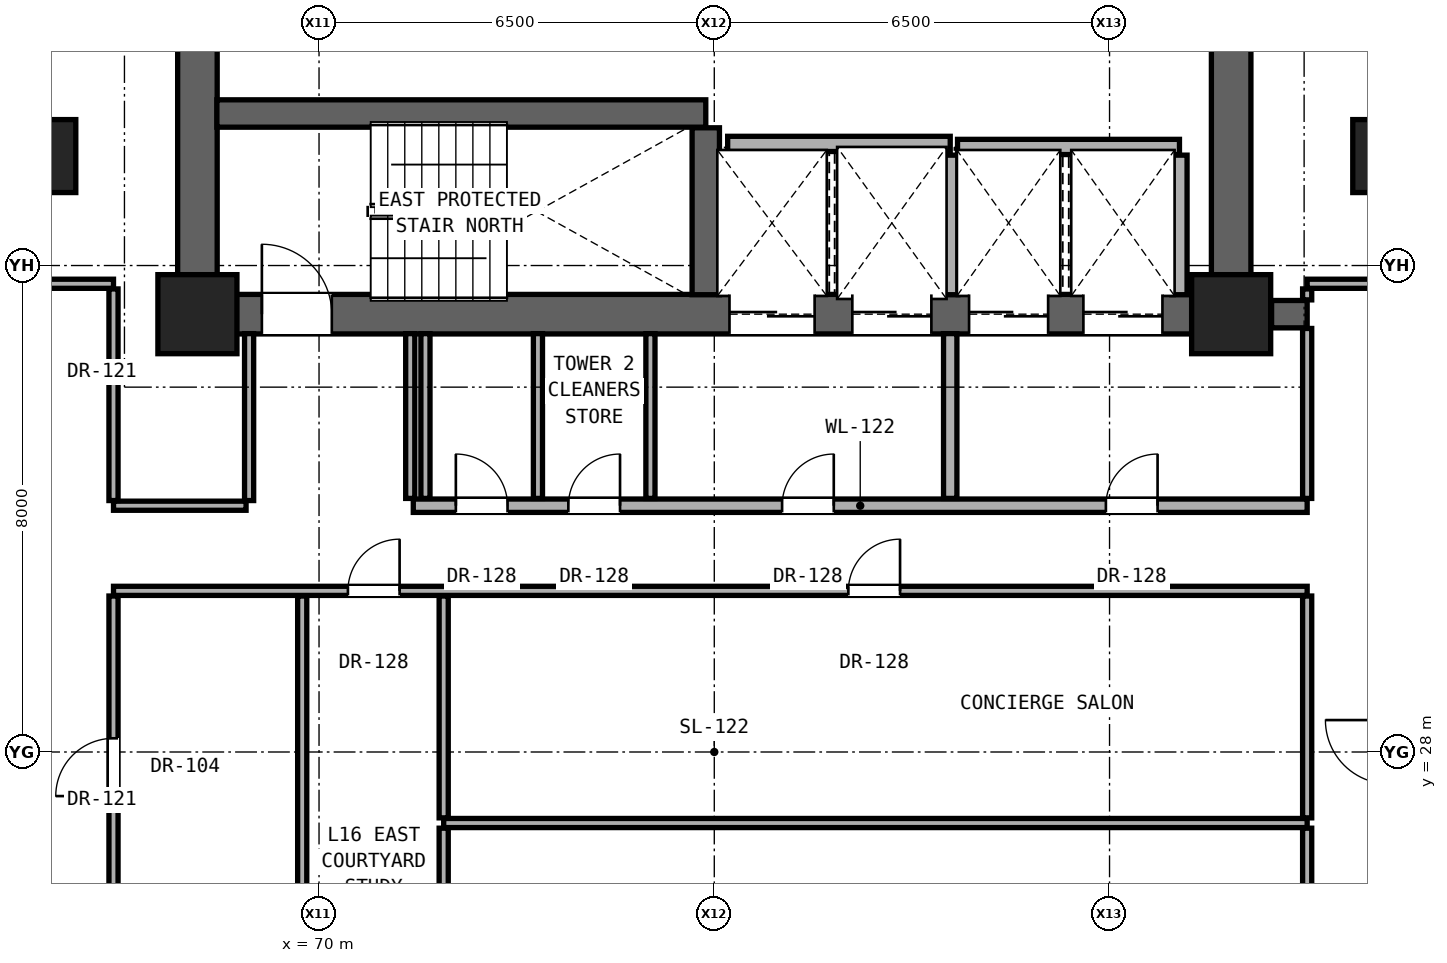
"""IFC4 building model, lengths in metres.
Left out: names, types, materials, properties, quantities, classifications, styles, units other than length and angle.
Written with IfcOpenShell. Run it as: python <this file> out.ifc"""

import sys

from ifc_helpers import new_model, si_unit, direction, frame, frame_2d, origin, origin_2d, place, context, subcontext, project, spatial, rectangle, extrude, element, fill, save


model = new_model("IFC4")
c1 = context("Model", 3, precision=1e-05, world=origin(), true_north=direction((0.0, 1.0)))
c2 = subcontext(c1, "Body", "Model", "MODEL_VIEW")
j1 = project(units=[si_unit("LENGTHUNIT", "METRE"), si_unit("PLANEANGLEUNIT", "RADIAN")], contexts=[c1])
p1 = place(None, origin())
s1 = spatial("IfcSite", under=j1, at=p1, CompositionType="ELEMENT")
p2 = place(p1, origin())
s2 = spatial("IfcBuilding", under=s1, at=p2, CompositionType="ELEMENT")
p3 = place(p2, frame((0.0, 0.0, 58.7)))
s3 = spatial("IfcBuildingStorey", under=s2, at=p3, CompositionType="ELEMENT", Elevation=58.7)
for number, where, z_axis, x_axis in (
    (1, (68.0, 35.2, 0.0), (0.0, 0.0, 1.0), (1.0, 0.0, 0.0)),
    (2, (85.0, 35.2, 0.0), (0.0, 0.0, 1.0), (1.0, 0.0, 0.0)),
):
    element("IfcColumn", number, at=place(p3, frame(where, z_axis=z_axis, x_axis=x_axis)), inside=s3, PredefinedType="COLUMN", context=c2, shape_type="SweptSolid", body=[
        extrude(rectangle(XDim=1.3, YDim=1.3, at=origin_2d()), origin(), (0.0, 0.0, 1.0), 3.3),
    ])
for number, where, z_axis, x_axis in (
    (3, (65.6, 37.8, 0.0), (0.0, 0.0, 1.0), (1.0, 0.0, 0.0)),
    (4, (87.4, 37.8, 0.0), (0.0, 0.0, 1.0), (1.0, 0.0, 0.0)),
):
    element("IfcColumn", number, at=place(p3, frame(where, z_axis=z_axis, x_axis=x_axis)), inside=s3, PredefinedType="PILASTER", context=c2, shape_type="SweptSolid", body=[
        extrude(rectangle(XDim=0.8, YDim=1.2, at=origin_2d()), origin(), (0.0, 0.0, 1.0), 3.3),
    ])
for number, where, z_axis, x_axis in (
    (5, (68.0, 35.2, 0.0), (0.0, 0.0, 1.0), (0.0, 1.0, 0.0)),
    (6, (85.0, 35.2, 0.0), (0.0, 0.0, 1.0), (0.0, 1.0, 0.0)),
):
    element("IfcWall", number, at=place(p3, frame(where, z_axis=z_axis, x_axis=x_axis)), inside=s3, PredefinedType="SHEAR", context=c2, shape_type="SweptSolid", body=[
        extrude(rectangle(XDim=5.6, YDim=0.65, at=frame_2d((2.8, 0.0))), origin(), (0.0, 0.0, 1.0), 3.06),
    ])
p4 = place(p3, frame((68.0, 35.2, 0.0), z_axis=(0.0, 0.0, 1.0), x_axis=(1.0, 0.0, 0.0)))
e7 = element("IfcWall", 7, at=p4, inside=s3, PredefinedType="SHEAR", context=c2, shape_type="SweptSolid", body=[
    extrude(rectangle(XDim=17.0, YDim=0.65, at=frame_2d((8.5, 0.0))), origin(), (0.0, 0.0, 1.0), 3.06),
])
p5 = place(p4, frame((1.06, 0.0, 0.0)))
e8 = element("IfcOpeningElement", 8, at=p5, cuts=e7, PredefinedType="OPENING", context=c2, shape_type="SweptSolid", body=[
    extrude(rectangle(XDim=1.15, YDim=2.2, at=frame_2d((0.575, 1.1))), frame((0.0, 0.335, 0.0), z_axis=(0.0, -1.0, 0.0), x_axis=(1.0, 0.0, 0.0)), (0.0, 0.0, 1.0), 0.67),
])
p6 = place(p4, frame((8.75, 0.0, 0.0)))
e9 = element("IfcOpeningElement", 9, at=p6, cuts=e7, PredefinedType="OPENING", context=c2, shape_type="SweptSolid", body=[
    extrude(rectangle(XDim=1.4, YDim=2.35, at=frame_2d((0.7, 1.175))), frame((0.0, 0.335, 0.0), z_axis=(0.0, -1.0, 0.0), x_axis=(1.0, 0.0, 0.0)), (0.0, 0.0, 1.0), 0.67),
])
p7 = place(p4, frame((10.77, 0.0, 0.0)))
e10 = element("IfcOpeningElement", 10, at=p7, cuts=e7, PredefinedType="OPENING", context=c2, shape_type="SweptSolid", body=[
    extrude(rectangle(XDim=1.3, YDim=2.3, at=frame_2d((0.65, 1.15))), frame((0.0, 0.335, 0.0), z_axis=(0.0, -1.0, 0.0), x_axis=(1.0, 0.0, 0.0)), (0.0, 0.0, 1.0), 0.67),
])
p8 = place(p4, frame((12.69, 0.0, 0.0)))
e11 = element("IfcOpeningElement", 11, at=p8, cuts=e7, PredefinedType="OPENING", context=c2, shape_type="SweptSolid", body=[
    extrude(rectangle(XDim=1.3, YDim=2.3, at=frame_2d((0.65, 1.15))), frame((0.0, 0.335, 0.0), z_axis=(0.0, -1.0, 0.0), x_axis=(1.0, 0.0, 0.0)), (0.0, 0.0, 1.0), 0.67),
])
p9 = place(p4, frame((14.57, 0.0, 0.0)))
e12 = element("IfcOpeningElement", 12, at=p9, cuts=e7, PredefinedType="OPENING", context=c2, shape_type="SweptSolid", body=[
    extrude(rectangle(XDim=1.3, YDim=2.3, at=frame_2d((0.65, 1.15))), frame((0.0, 0.335, 0.0), z_axis=(0.0, -1.0, 0.0), x_axis=(1.0, 0.0, 0.0)), (0.0, 0.0, 1.0), 0.67),
])
p10 = place(p3, frame((72.05, 26.832, 0.0), z_axis=(0.0, 0.0, 1.0), x_axis=(1.0, 0.0, 0.0)))
e13 = element("IfcWall", 13, at=p10, inside=s3, PredefinedType="PARTITIONING", context=c2, shape_type="SweptSolid", body=[
    extrude(rectangle(XDim=14.2, YDim=0.15, at=frame_2d((7.1, 0.0))), origin(), (0.0, 0.0, 1.0), 2.125),
])
p11 = place(p3, frame((66.62, 30.65, 0.0), z_axis=(0.0, 0.0, 1.0), x_axis=(1.0, 0.0, 0.0)))
e14 = element("IfcWall", 14, at=p11, inside=s3, PredefinedType="PARTITIONING", context=c2, shape_type="SweptSolid", body=[
    extrude(rectangle(XDim=19.63, YDim=0.15, at=frame_2d((9.815, 0.0))), origin(), (0.0, 0.0, 1.0), 2.125),
])
p12 = place(p11, frame((3.855, 0.0, 0.0)))
e15 = element("IfcOpeningElement", 15, at=p12, cuts=e14, PredefinedType="OPENING", context=c2, shape_type="SweptSolid", body=[
    extrude(rectangle(XDim=0.85, YDim=2.01, at=frame_2d((0.425, 1.005))), frame((0.0, 0.085, 0.0), z_axis=(0.0, -1.0, 0.0), x_axis=(1.0, 0.0, 0.0)), (0.0, 0.0, 1.0), 0.17),
])
p13 = place(p11, frame((12.085, 0.0, 0.0)))
e16 = element("IfcOpeningElement", 16, at=p13, cuts=e14, PredefinedType="OPENING", context=c2, shape_type="SweptSolid", body=[
    extrude(rectangle(XDim=0.85, YDim=2.01, at=frame_2d((0.425, 1.005))), frame((0.0, 0.085, 0.0), z_axis=(0.0, -1.0, 0.0), x_axis=(1.0, 0.0, 0.0)), (0.0, 0.0, 1.0), 0.17),
])
p14 = place(p3, frame((66.62, 32.05, 0.0), z_axis=(0.0, 0.0, 1.0), x_axis=(1.0, 0.0, 0.0)))
e17 = element("IfcWall", 17, at=p14, inside=s3, PredefinedType="PARTITIONING", context=c2, shape_type="SweptSolid", body=[
    extrude(rectangle(XDim=2.18, YDim=0.15, at=frame_2d((1.09, 0.0))), origin(), (0.0, 0.0, 1.0), 2.125),
])
p15 = place(p3, frame((71.55, 32.05, 0.0), z_axis=(0.0, 0.0, 1.0), x_axis=(1.0, 0.0, 0.0)))
e18 = element("IfcWall", 18, at=p15, inside=s3, PredefinedType="SOLIDWALL", context=c2, shape_type="SweptSolid", body=[
    extrude(rectangle(XDim=14.7, YDim=0.22, at=frame_2d((7.35, 0.0))), origin(), (0.0, 0.0, 1.0), 2.125),
])
p16 = place(p15, frame((11.39, 0.0, 0.0)))
e19 = element("IfcOpeningElement", 19, at=p16, cuts=e18, PredefinedType="OPENING", context=c2, shape_type="SweptSolid", body=[
    extrude(rectangle(XDim=0.85, YDim=2.01, at=frame_2d((0.425, 1.005))), frame((0.0, 0.12, 0.0), z_axis=(0.0, -1.0, 0.0), x_axis=(1.0, 0.0, 0.0)), (0.0, 0.0, 1.0), 0.24),
])
p17 = place(p15, frame((6.065, 0.0, 0.0)))
e20 = element("IfcOpeningElement", 20, at=p17, cuts=e18, PredefinedType="OPENING", context=c2, shape_type="SweptSolid", body=[
    extrude(rectangle(XDim=0.85, YDim=2.01, at=frame_2d((0.425, 1.005))), frame((0.0, 0.12, 0.0), z_axis=(0.0, -1.0, 0.0), x_axis=(1.0, 0.0, 0.0)), (0.0, 0.0, 1.0), 0.24),
])
p18 = place(p15, frame((0.7, 0.0, 0.0)))
e21 = element("IfcOpeningElement", 21, at=p18, cuts=e18, PredefinedType="OPENING", context=c2, shape_type="SweptSolid", body=[
    extrude(rectangle(XDim=0.85, YDim=2.01, at=frame_2d((0.425, 1.005))), frame((0.0, 0.12, 0.0), z_axis=(0.0, -1.0, 0.0), x_axis=(1.0, 0.0, 0.0)), (0.0, 0.0, 1.0), 0.24),
])
p19 = place(p15, frame((2.55, 0.0, 0.0)))
e22 = element("IfcOpeningElement", 22, at=p19, cuts=e18, PredefinedType="OPENING", context=c2, shape_type="SweptSolid", body=[
    extrude(rectangle(XDim=0.85, YDim=2.01, at=frame_2d((0.425, 1.005))), frame((0.0, 0.12, 0.0), z_axis=(0.0, -1.0, 0.0), x_axis=(1.0, 0.0, 0.0)), (0.0, 0.0, 1.0), 0.24),
])
p20 = place(p3, frame((85.665, 35.2, 0.0), z_axis=(0.0, 0.0, 1.0), x_axis=(1.0, 0.0, 0.0)))
e23 = element("IfcWall", 23, at=p20, inside=s3, PredefinedType="SHEAR", context=c2, shape_type="SweptSolid", body=[
    extrude(rectangle(XDim=0.585, YDim=0.45, at=frame_2d((0.292, 0.0))), origin(), (0.0, 0.0, 1.0), 3.06),
])
p21 = place(p3, frame((65.25, 35.7, 0.0), z_axis=(0.0, 0.0, 1.0), x_axis=(1.0, 0.0, 0.0)))
e24 = element("IfcWall", 24, at=p21, inside=s3, PredefinedType="PARTITIONING", context=c2, shape_type="SweptSolid", body=[
    extrude(rectangle(XDim=1.37, YDim=0.15, at=frame_2d((0.685, 0.0))), origin(), (0.0, 0.0, 1.0), 3.06),
])
p22 = place(p3, frame((86.25, 35.7, 0.0), z_axis=(0.0, 0.0, 1.0), x_axis=(1.0, 0.0, 0.0)))
e25 = element("IfcWall", 25, at=p22, inside=s3, PredefinedType="PARTITIONING", context=c2, shape_type="SweptSolid", body=[
    extrude(rectangle(XDim=1.35, YDim=0.15, at=frame_2d((0.675, 0.0))), origin(), (0.0, 0.0, 1.0), 3.06),
])
p23 = place(p3, frame((80.5, 37.95, 0.0), z_axis=(0.0, 0.0, 1.0), x_axis=(1.0, 0.0, 0.0)))
e26 = element("IfcWall", 26, at=p23, inside=s3, PredefinedType="SOLIDWALL", context=c2, shape_type="SweptSolid", body=[
    extrude(rectangle(XDim=3.65, YDim=0.25, at=frame_2d((1.825, 0.0))), origin(), (0.0, 0.0, 1.0), 3.06),
])
p24 = place(p3, frame((76.72, 38.0, 0.0), z_axis=(0.0, 0.0, 1.0), x_axis=(1.0, 0.0, 0.0)))
e27 = element("IfcWall", 27, at=p24, inside=s3, PredefinedType="SOLIDWALL", context=c2, shape_type="SweptSolid", body=[
    extrude(rectangle(XDim=3.66, YDim=0.25, at=frame_2d((1.83, 0.0))), origin(), (0.0, 0.0, 1.0), 3.06),
])
p25 = place(p3, frame((68.32, 38.5, 0.0), z_axis=(0.0, 0.0, 1.0), x_axis=(1.0, 0.0, 0.0)))
e28 = element("IfcWall", 28, at=p25, inside=s3, PredefinedType="SHEAR", context=c2, shape_type="SweptSolid", body=[
    extrude(rectangle(XDim=8.04, YDim=0.45, at=frame_2d((4.02, 0.0))), origin(), (0.0, 0.0, 1.0), 3.06),
])
p26 = place(p3, frame((66.62, 24.935, 0.0), z_axis=(0.0, 0.0, 1.0), x_axis=(0.0, 1.0, 0.0)))
e29 = element("IfcWall", 29, at=p26, inside=s3, PredefinedType="PARTITIONING", context=c2, shape_type="SweptSolid", body=[
    extrude(rectangle(XDim=5.63, YDim=0.15, at=frame_2d((2.815, 0.0))), origin(), (0.0, 0.0, 1.0), 2.279),
])
p27 = place(p26, frame((2.34, 0.0, 0.0)))
e30 = element("IfcOpeningElement", 30, at=p27, cuts=e29, PredefinedType="OPENING", context=c2, shape_type="SweptSolid", body=[
    extrude(rectangle(XDim=0.95, YDim=2.15, at=frame_2d((0.475, 1.075))), frame((0.0, 0.085, 0.0), z_axis=(0.0, -1.0, 0.0), x_axis=(1.0, 0.0, 0.0)), (0.0, 0.0, 1.0), 0.17),
])
p28 = place(p3, frame((66.62, 32.135, 0.0), z_axis=(0.0, 0.0, 1.0), x_axis=(0.0, 1.0, 0.0)))
e31 = element("IfcWall", 31, at=p28, inside=s3, PredefinedType="PARTITIONING", context=c2, shape_type="SweptSolid", body=[
    extrude(rectangle(XDim=3.48, YDim=0.15, at=frame_2d((1.74, 0.0))), origin(), (0.0, 0.0, 1.0), 2.452),
])
p29 = place(p3, frame((68.85, 32.135, 0.0), z_axis=(0.0, 0.0, 1.0), x_axis=(0.0, 1.0, 0.0)))
e32 = element("IfcWall", 32, at=p29, inside=s3, PredefinedType="PARTITIONING", context=c2, shape_type="SweptSolid", body=[
    extrude(rectangle(XDim=2.745, YDim=0.15, at=frame_2d((1.373, 0.0))), origin(), (0.0, 0.0, 1.0), 3.06),
])
p30 = place(p3, frame((69.723, 24.935, 0.0), z_axis=(0.0, 0.0, 1.0), x_axis=(0.0, 1.0, 0.0)))
e33 = element("IfcWall", 33, at=p30, inside=s3, PredefinedType="PARTITIONING", context=c2, shape_type="SweptSolid", body=[
    extrude(rectangle(XDim=5.63, YDim=0.15, at=frame_2d((2.815, 0.0))), origin(), (0.0, 0.0, 1.0), 2.125),
])
for number, where, z_axis, x_axis in (
    (34, (71.5, 32.17, 0.0), (0.0, 0.0, 1.0), (0.0, 1.0, 0.0)),
    (35, (71.75, 32.17, 0.0), (0.0, 0.0, 1.0), (0.0, 1.0, 0.0)),
):
    element("IfcWall", number, at=place(p3, frame(where, z_axis=z_axis, x_axis=x_axis)), inside=s3, PredefinedType="PARTITIONING", context=c2, shape_type="SweptSolid", body=[
        extrude(rectangle(XDim=2.71, YDim=0.15, at=frame_2d((1.355, 0.0))), origin(), (0.0, 0.0, 1.0), 3.06),
    ])
p31 = place(p3, frame((72.05, 22.435, 0.0), z_axis=(0.0, 0.0, 1.0), x_axis=(0.0, 1.0, 0.0)))
e36 = element("IfcWall", 36, at=p31, inside=s3, PredefinedType="PARTITIONING", context=c2, shape_type="SweptSolid", body=[
    extrude(rectangle(XDim=4.312, YDim=0.15, at=frame_2d((2.156, 0.0))), origin(), (0.0, 0.0, 1.0), 2.589),
])
p32 = place(p3, frame((72.05, 26.917, 0.0), z_axis=(0.0, 0.0, 1.0), x_axis=(0.0, 1.0, 0.0)))
e37 = element("IfcWall", 37, at=p32, inside=s3, PredefinedType="PARTITIONING", context=c2, shape_type="SweptSolid", body=[
    extrude(rectangle(XDim=3.648, YDim=0.15, at=frame_2d((1.824, 0.0))), origin(), (0.0, 0.0, 1.0), 2.125),
])
for number, where, z_axis, x_axis in (
    (38, (73.6, 32.17, 0.0), (0.0, 0.0, 1.0), (0.0, 1.0, 0.0)),
    (39, (75.45, 32.17, 0.0), (0.0, 0.0, 1.0), (0.0, 1.0, 0.0)),
):
    element("IfcWall", number, at=place(p3, frame(where, z_axis=z_axis, x_axis=x_axis)), inside=s3, PredefinedType="PARTITIONING", context=c2, shape_type="SweptSolid", body=[
        extrude(rectangle(XDim=2.71, YDim=0.15, at=frame_2d((1.355, 0.0))), origin(), (0.0, 0.0, 1.0), 3.06),
    ])
p33 = place(p3, frame((76.36, 35.52, 0.0), z_axis=(0.0, 0.0, 1.0), x_axis=(0.0, 1.0, 0.0)))
e40 = element("IfcWall", 40, at=p33, inside=s3, PredefinedType="SHEAR", context=c2, shape_type="SweptSolid", body=[
    extrude(rectangle(XDim=2.745, YDim=0.45, at=frame_2d((1.373, 0.0))), origin(), (0.0, 0.0, 1.0), 3.06),
])
p34 = place(p3, frame((80.38, 32.17, 0.0), z_axis=(0.0, 0.0, 1.0), x_axis=(0.0, 1.0, 0.0)))
e41 = element("IfcWall", 41, at=p34, inside=s3, PredefinedType="SOLIDWALL", context=c2, shape_type="SweptSolid", body=[
    extrude(rectangle(XDim=2.71, YDim=0.22, at=frame_2d((1.355, 0.0))), origin(), (0.0, 0.0, 1.0), 3.06),
])
for number, where, z_axis, x_axis in (
    (42, (80.38, 35.52, 0.0), (0.0, 0.0, 1.0), (0.0, 1.0, 0.0)),
    (43, (84.15, 35.52, 0.0), (0.0, 0.0, 1.0), (0.0, 1.0, 0.0)),
):
    element("IfcWall", number, at=place(p3, frame(where, z_axis=z_axis, x_axis=x_axis)), inside=s3, PredefinedType="SOLIDWALL", context=c2, shape_type="SweptSolid", body=[
        extrude(rectangle(XDim=2.295, YDim=0.25, at=frame_2d((1.147, 0.0))), origin(), (0.0, 0.0, 1.0), 3.06),
    ])
p35 = place(p3, frame((86.25, 22.435, 0.0), z_axis=(0.0, 0.0, 1.0), x_axis=(0.0, 1.0, 0.0)))
e44 = element("IfcWall", 44, at=p35, inside=s3, PredefinedType="PARTITIONING", context=c2, shape_type="SweptSolid", body=[
    extrude(rectangle(XDim=4.312, YDim=0.15, at=frame_2d((2.156, 0.0))), origin(), (0.0, 0.0, 1.0), 3.06),
])
p36 = place(p3, frame((86.25, 26.917, 0.0), z_axis=(0.0, 0.0, 1.0), x_axis=(0.0, 1.0, 0.0)))
e45 = element("IfcWall", 45, at=p36, inside=s3, PredefinedType="PARTITIONING", context=c2, shape_type="SweptSolid", body=[
    extrude(rectangle(XDim=3.648, YDim=0.15, at=frame_2d((1.824, 0.0))), origin(), (0.0, 0.0, 1.0), 2.279),
])
p37 = place(p3, frame((86.25, 32.17, 0.0), z_axis=(0.0, 0.0, 1.0), x_axis=(0.0, 1.0, 0.0)))
e46 = element("IfcWall", 46, at=p37, inside=s3, PredefinedType="PARTITIONING", context=c2, shape_type="SweptSolid", body=[
    extrude(rectangle(XDim=2.795, YDim=0.15, at=frame_2d((1.397, 0.0))), origin(), (0.0, 0.0, 1.0), 2.452),
])
p38 = place(p3, frame((86.25, 35.435, 0.0), z_axis=(0.0, 0.0, 1.0), x_axis=(0.0, 1.0, 0.0)))
e47 = element("IfcWall", 47, at=p38, inside=s3, PredefinedType="PARTITIONING", context=c2, shape_type="SweptSolid", body=[
    extrude(rectangle(XDim=0.18, YDim=0.15, at=frame_2d((0.09, 0.0))), origin(), (0.0, 0.0, 1.0), 2.452),
])
p39 = place(p16, origin())
e48 = element("IfcDoor", 48, at=p39, inside=s3, OperationType="SINGLE_SWING_RIGHT", PredefinedType="DOOR", context=c2, shape_type="SweptSolid", body=[
    extrude(rectangle(XDim=0.85, YDim=2.01, at=frame_2d((0.425, 1.005))), frame((0.0, 0.025, 0.0), z_axis=(0.0, -1.0, 0.0), x_axis=(1.0, 0.0, 0.0)), (0.0, 0.0, 1.0), 0.05),
])
fill(e19, e48)
p40 = place(p5, origin())
e49 = element("IfcDoor", 49, at=p40, inside=s3, OperationType="SINGLE_SWING_LEFT", PredefinedType="DOOR", context=c2, shape_type="SweptSolid", body=[
    extrude(rectangle(XDim=1.15, YDim=2.2, at=frame_2d((0.575, 1.1))), frame((0.0, 0.025, 0.0), z_axis=(0.0, -1.0, 0.0), x_axis=(1.0, 0.0, 0.0)), (0.0, 0.0, 1.0), 0.05),
])
fill(e8, e49)
p41 = place(p17, origin())
e50 = element("IfcDoor", 50, at=p41, inside=s3, OperationType="SINGLE_SWING_RIGHT", PredefinedType="DOOR", context=c2, shape_type="SweptSolid", body=[
    extrude(rectangle(XDim=0.85, YDim=2.01, at=frame_2d((0.425, 1.005))), frame((0.0, 0.025, 0.0), z_axis=(0.0, -1.0, 0.0), x_axis=(1.0, 0.0, 0.0)), (0.0, 0.0, 1.0), 0.05),
])
fill(e20, e50)
p42 = place(p18, origin())
e51 = element("IfcDoor", 51, at=p42, inside=s3, OperationType="SINGLE_SWING_LEFT", PredefinedType="DOOR", context=c2, shape_type="SweptSolid", body=[
    extrude(rectangle(XDim=0.85, YDim=2.01, at=frame_2d((0.425, 1.005))), frame((0.0, 0.025, 0.0), z_axis=(0.0, -1.0, 0.0), x_axis=(1.0, 0.0, 0.0)), (0.0, 0.0, 1.0), 0.05),
])
fill(e21, e51)
p43 = place(p19, origin())
e52 = element("IfcDoor", 52, at=p43, inside=s3, OperationType="SINGLE_SWING_RIGHT", PredefinedType="DOOR", context=c2, shape_type="SweptSolid", body=[
    extrude(rectangle(XDim=0.85, YDim=2.01, at=frame_2d((0.425, 1.005))), frame((0.0, 0.025, 0.0), z_axis=(0.0, -1.0, 0.0), x_axis=(1.0, 0.0, 0.0)), (0.0, 0.0, 1.0), 0.05),
])
fill(e22, e52)
p44 = place(p27, origin())
e53 = element("IfcDoor", 53, at=p44, inside=s3, OperationType="SINGLE_SWING_LEFT", PredefinedType="DOOR", context=c2, shape_type="SweptSolid", body=[
    extrude(rectangle(XDim=0.95, YDim=2.15, at=frame_2d((0.475, 1.075))), frame((0.0, 0.025, 0.0), z_axis=(0.0, -1.0, 0.0), x_axis=(1.0, 0.0, 0.0)), (0.0, 0.0, 1.0), 0.05),
])
fill(e30, e53)
p45 = place(p12, origin())
e54 = element("IfcDoor", 54, at=p45, inside=s3, OperationType="SINGLE_SWING_RIGHT", PredefinedType="DOOR", context=c2, shape_type="SweptSolid", body=[
    extrude(rectangle(XDim=0.85, YDim=2.01, at=frame_2d((0.425, 1.005))), frame((0.0, 0.025, 0.0), z_axis=(0.0, -1.0, 0.0), x_axis=(1.0, 0.0, 0.0)), (0.0, 0.0, 1.0), 0.05),
])
fill(e15, e54)
p46 = place(p13, origin())
e55 = element("IfcDoor", 55, at=p46, inside=s3, OperationType="SINGLE_SWING_RIGHT", PredefinedType="DOOR", context=c2, shape_type="SweptSolid", body=[
    extrude(rectangle(XDim=0.85, YDim=2.01, at=frame_2d((0.425, 1.005))), frame((0.0, 0.025, 0.0), z_axis=(0.0, -1.0, 0.0), x_axis=(1.0, 0.0, 0.0)), (0.0, 0.0, 1.0), 0.05),
])
fill(e16, e55)
p47 = place(p6, origin())
e56 = element("IfcDoor", 56, at=p47, inside=s3, OperationType="DOUBLE_DOOR_SLIDING", PredefinedType="DOOR", context=c2, shape_type="SweptSolid", body=[
    extrude(rectangle(XDim=1.4, YDim=2.35, at=frame_2d((0.7, 1.175))), frame((0.0, 0.025, 0.0), z_axis=(0.0, -1.0, 0.0), x_axis=(1.0, 0.0, 0.0)), (0.0, 0.0, 1.0), 0.05),
])
fill(e9, e56)
p48 = place(p7, origin())
e57 = element("IfcDoor", 57, at=p48, inside=s3, OperationType="DOUBLE_DOOR_SLIDING", PredefinedType="DOOR", context=c2, shape_type="SweptSolid", body=[
    extrude(rectangle(XDim=1.3, YDim=2.3, at=frame_2d((0.65, 1.15))), frame((0.0, 0.025, 0.0), z_axis=(0.0, -1.0, 0.0), x_axis=(1.0, 0.0, 0.0)), (0.0, 0.0, 1.0), 0.05),
])
fill(e10, e57)
p49 = place(p8, origin())
e58 = element("IfcDoor", 58, at=p49, inside=s3, OperationType="DOUBLE_DOOR_SLIDING", PredefinedType="DOOR", context=c2, shape_type="SweptSolid", body=[
    extrude(rectangle(XDim=1.3, YDim=2.3, at=frame_2d((0.65, 1.15))), frame((0.0, 0.025, 0.0), z_axis=(0.0, -1.0, 0.0), x_axis=(1.0, 0.0, 0.0)), (0.0, 0.0, 1.0), 0.05),
])
fill(e11, e58)
p50 = place(p9, origin())
e59 = element("IfcDoor", 59, at=p50, inside=s3, OperationType="DOUBLE_DOOR_SLIDING", PredefinedType="DOOR", context=c2, shape_type="SweptSolid", body=[
    extrude(rectangle(XDim=1.3, YDim=2.3, at=frame_2d((0.65, 1.15))), frame((0.0, 0.025, 0.0), z_axis=(0.0, -1.0, 0.0), x_axis=(1.0, 0.0, 0.0)), (0.0, 0.0, 1.0), 0.05),
])
fill(e12, e59)
save(model, sys.argv[1])
